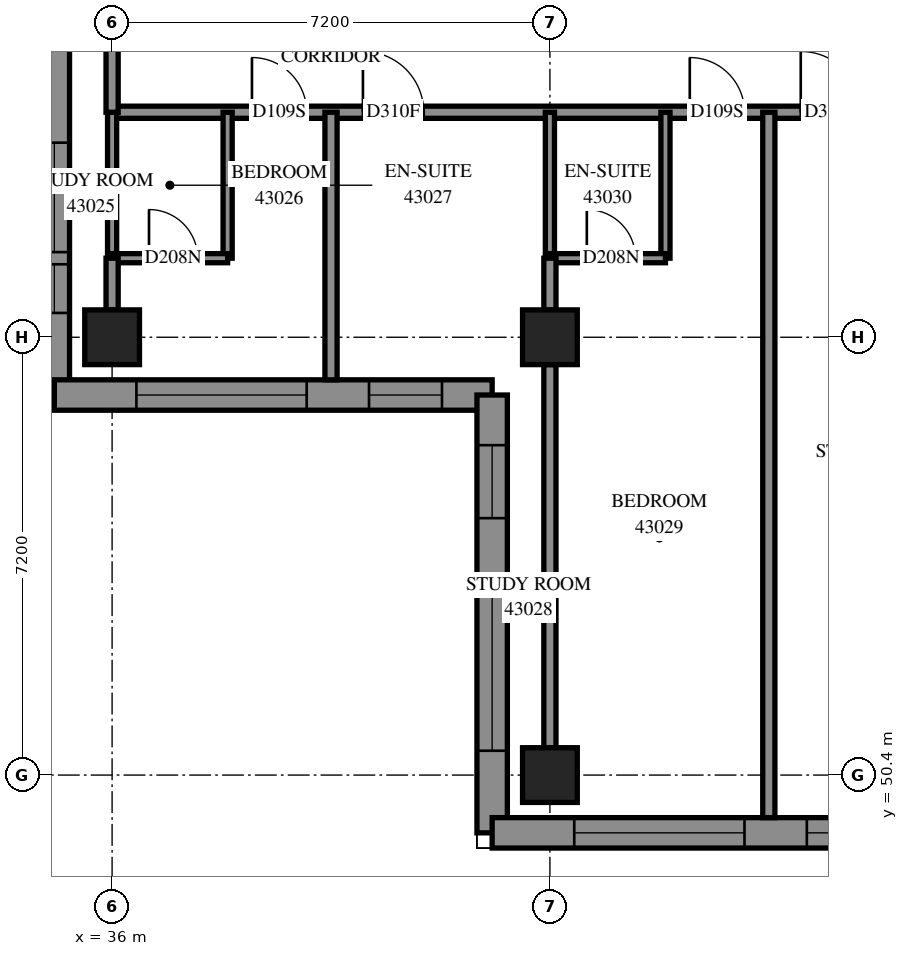
"""IFC4 building model, lengths in metres.
Left out: names, types, materials, properties, quantities, classifications, styles, units other than length and angle.
Written with IfcOpenShell. Run it as: python <this file> out.ifc"""

import sys

from ifc_helpers import new_model, si_unit, direction, frame, frame_2d, origin, origin_2d, place, context, subcontext, project, spatial, polyline, rectangle, outline, extrude, element, fill, save


model = new_model("IFC4")
c1 = context("Model", 3, precision=1e-05, world=origin(), true_north=direction((0.0, 1.0)))
c2 = subcontext(c1, "Body", "Model", "MODEL_VIEW")
j1 = project(units=[si_unit("LENGTHUNIT", "METRE"), si_unit("PLANEANGLEUNIT", "RADIAN")], contexts=[c1])
p1 = place(None, origin())
s1 = spatial("IfcSite", under=j1, at=p1, CompositionType="ELEMENT")
p2 = place(p1, origin())
s2 = spatial("IfcBuilding", under=s1, at=p2, CompositionType="ELEMENT")
p3 = place(p2, frame((0.0, 0.0, 159.2)))
s3 = spatial("IfcBuildingStorey", under=s2, at=p3, CompositionType="ELEMENT", Elevation=159.2)
for number, where, z_axis, x_axis in (
    (1, (36.0, 57.6, 0.0), (0.0, 0.0, 1.0), (1.0, 0.0, 0.0)),
    (2, (43.2, 50.4, 0.0), (0.0, 0.0, 1.0), (1.0, 0.0, 0.0)),
    (3, (43.2, 57.6, 0.0), (0.0, 0.0, 1.0), (1.0, 0.0, 0.0)),
):
    element("IfcColumn", number, at=place(p3, frame(where, z_axis=z_axis, x_axis=x_axis)), inside=s3, PredefinedType="COLUMN", context=c2, shape_type="SweptSolid", body=[
        extrude(rectangle(XDim=0.9, YDim=0.9, at=origin_2d()), origin(), (0.0, 0.0, 1.0), 3.1),
    ])
p4 = place(p3, frame((35.05, 62.738, 0.0), z_axis=(0.0, 0.0, 1.0), x_axis=(0.0, -1.0, 0.0)))
e4 = element("IfcWall", 4, at=p4, inside=s3, PredefinedType="SOLIDWALL", context=c2, shape_type="SweptSolid", body=[
    extrude(outline(polyline([(0.25, -0.25), (6.338, -0.25), (5.838, 0.25), (-0.25, 0.25), (0.25, -0.25)])), origin(), (0.0, 0.0, 1.0), 3.1),
])
p5 = place(p4, frame((1.938, 0.0, 0.7)))
e5 = element("IfcOpeningElement", 5, at=p5, cuts=e4, PredefinedType="OPENING", context=c2, shape_type="SweptSolid", body=[
    extrude(rectangle(XDim=1.8, YDim=2.2, at=frame_2d((0.9, 1.1))), frame((0.0, 0.26, 0.0), z_axis=(0.0, -1.0, 0.0), x_axis=(1.0, 0.0, 0.0)), (0.0, 0.0, 1.0), 0.52),
])
p6 = place(p4, frame((3.938, 0.0, 0.45)))
e6 = element("IfcOpeningElement", 6, at=p6, cuts=e4, PredefinedType="OPENING", context=c2, shape_type="SweptSolid", body=[
    extrude(rectangle(XDim=0.8, YDim=2.5, at=frame_2d((0.4, 1.25))), frame((0.0, 0.26, 0.0), z_axis=(0.0, -1.0, 0.0), x_axis=(1.0, 0.0, 0.0)), (0.0, 0.0, 1.0), 0.52),
])
p7 = place(p3, frame((35.05, 56.65, 0.0), z_axis=(0.0, 0.0, 1.0), x_axis=(1.0, 0.0, 0.0)))
e7 = element("IfcWall", 7, at=p7, inside=s3, PredefinedType="SOLIDWALL", context=c2, shape_type="SweptSolid", body=[
    extrude(outline(polyline([(-0.25, -0.25), (6.95, -0.25), (7.45, 0.25), (0.25, 0.25), (-0.25, -0.25)])), origin(), (0.0, 0.0, 1.0), 3.1),
])
p8 = place(p7, frame((1.35, 0.0, 0.45)))
e8 = element("IfcOpeningElement", 8, at=p8, cuts=e7, PredefinedType="OPENING", context=c2, shape_type="SweptSolid", body=[
    extrude(rectangle(XDim=2.8, YDim=2.5, at=frame_2d((1.4, 1.25))), frame((0.0, 0.26, 0.0), z_axis=(0.0, -1.0, 0.0), x_axis=(1.0, 0.0, 0.0)), (0.0, 0.0, 1.0), 0.52),
])
p9 = place(p7, frame((5.175, 0.0, 0.45)))
e9 = element("IfcOpeningElement", 9, at=p9, cuts=e7, PredefinedType="OPENING", context=c2, shape_type="SweptSolid", body=[
    extrude(rectangle(XDim=1.2, YDim=2.5, at=frame_2d((0.6, 1.25))), frame((0.0, 0.26, 0.0), z_axis=(0.0, -1.0, 0.0), x_axis=(1.0, 0.0, 0.0)), (0.0, 0.0, 1.0), 0.52),
])
p10 = place(p3, frame((42.25, 56.65, 0.0), z_axis=(0.0, 0.0, 1.0), x_axis=(0.0, -1.0, 0.0)))
e10 = element("IfcWall", 10, at=p10, inside=s3, PredefinedType="SOLIDWALL", context=c2, shape_type="SweptSolid", body=[
    extrude(outline(polyline([(0.25, -0.25), (7.45, -0.25), (6.95, 0.25), (-0.25, 0.25), (0.25, -0.25)])), origin(), (0.0, 0.0, 1.0), 3.1),
])
p11 = place(p10, frame((3.05, 0.0, 0.45)))
e11 = element("IfcOpeningElement", 11, at=p11, cuts=e10, PredefinedType="OPENING", context=c2, shape_type="SweptSolid", body=[
    extrude(rectangle(XDim=2.8, YDim=2.5, at=frame_2d((1.4, 1.25))), frame((0.0, 0.26, 0.0), z_axis=(0.0, -1.0, 0.0), x_axis=(1.0, 0.0, 0.0)), (0.0, 0.0, 1.0), 0.52),
])
p12 = place(p10, frame((0.825, 0.0, 0.45)))
e12 = element("IfcOpeningElement", 12, at=p12, cuts=e10, PredefinedType="OPENING", context=c2, shape_type="SweptSolid", body=[
    extrude(rectangle(XDim=1.2, YDim=2.5, at=frame_2d((0.6, 1.25))), frame((0.0, 0.26, 0.0), z_axis=(0.0, -1.0, 0.0), x_axis=(1.0, 0.0, 0.0)), (0.0, 0.0, 1.0), 0.52),
])
p13 = place(p3, frame((42.25, 49.45, 0.0), z_axis=(0.0, 0.0, 1.0), x_axis=(1.0, 0.0, 0.0)))
e13 = element("IfcWall", 13, at=p13, inside=s3, PredefinedType="SOLIDWALL", context=c2, shape_type="SweptSolid", body=[
    extrude(outline(polyline([(-0.25, -0.25), (6.95, -0.25), (7.45, 0.25), (0.25, 0.25), (-0.25, -0.25)])), origin(), (0.0, 0.0, 1.0), 3.1),
])
p14 = place(p13, frame((1.35, 0.0, 0.45)))
e14 = element("IfcOpeningElement", 14, at=p14, cuts=e13, PredefinedType="OPENING", context=c2, shape_type="SweptSolid", body=[
    extrude(rectangle(XDim=2.8, YDim=2.5, at=frame_2d((1.4, 1.25))), frame((0.0, 0.26, 0.0), z_axis=(0.0, -1.0, 0.0), x_axis=(1.0, 0.0, 0.0)), (0.0, 0.0, 1.0), 0.52),
])
p15 = place(p13, frame((5.175, 0.0, 0.45)))
e15 = element("IfcOpeningElement", 15, at=p15, cuts=e13, PredefinedType="OPENING", context=c2, shape_type="SweptSolid", body=[
    extrude(rectangle(XDim=1.2, YDim=2.5, at=frame_2d((0.6, 1.25))), frame((0.0, 0.26, 0.0), z_axis=(0.0, -1.0, 0.0), x_axis=(1.0, 0.0, 0.0)), (0.0, 0.0, 1.0), 0.52),
])
p16 = place(p3, frame((36.0, 61.3, 0.0), z_axis=(0.0, 0.0, 1.0), x_axis=(1.0, 0.0, 0.0)))
e16 = element("IfcWall", 16, at=p16, inside=s3, PredefinedType="PARTITIONING", context=c2, shape_type="SweptSolid", body=[
    extrude(rectangle(XDim=16.9, YDim=0.2, at=frame_2d((8.45, 0.0))), origin(), (0.0, 0.0, 1.0), 3.1),
])
p17 = place(p16, frame((2.3, 0.0, 0.0)))
e17 = element("IfcOpeningElement", 17, at=p17, cuts=e16, PredefinedType="OPENING", context=c2, shape_type="SweptSolid", body=[
    extrude(rectangle(XDim=0.9, YDim=2.1, at=frame_2d((0.45, 1.05))), frame((0.0, 0.11, 0.0), z_axis=(0.0, -1.0, 0.0), x_axis=(1.0, 0.0, 0.0)), (0.0, 0.0, 1.0), 0.22),
])
p18 = place(p16, frame((4.125, 0.0, 0.0)))
e18 = element("IfcOpeningElement", 18, at=p18, cuts=e16, PredefinedType="OPENING", context=c2, shape_type="SweptSolid", body=[
    extrude(rectangle(XDim=1.0, YDim=2.1, at=frame_2d((0.5, 1.05))), frame((0.0, 0.11, 0.0), z_axis=(0.0, -1.0, 0.0), x_axis=(1.0, 0.0, 0.0)), (0.0, 0.0, 1.0), 0.22),
])
p19 = place(p16, frame((9.5, 0.0, 0.0)))
e19 = element("IfcOpeningElement", 19, at=p19, cuts=e16, PredefinedType="OPENING", context=c2, shape_type="SweptSolid", body=[
    extrude(rectangle(XDim=0.9, YDim=2.1, at=frame_2d((0.45, 1.05))), frame((0.0, 0.11, 0.0), z_axis=(0.0, -1.0, 0.0), x_axis=(1.0, 0.0, 0.0)), (0.0, 0.0, 1.0), 0.22),
])
p20 = place(p16, frame((11.325, 0.0, 0.0)))
e20 = element("IfcOpeningElement", 20, at=p20, cuts=e16, PredefinedType="OPENING", context=c2, shape_type="SweptSolid", body=[
    extrude(rectangle(XDim=1.0, YDim=2.1, at=frame_2d((0.5, 1.05))), frame((0.0, 0.11, 0.0), z_axis=(0.0, -1.0, 0.0), x_axis=(1.0, 0.0, 0.0)), (0.0, 0.0, 1.0), 0.22),
])
p21 = place(p16, frame((15.647, 0.0, 0.0)))
e21 = element("IfcOpeningElement", 21, at=p21, cuts=e16, PredefinedType="OPENING", context=c2, shape_type="SweptSolid", body=[
    extrude(rectangle(XDim=1.0, YDim=2.1, at=frame_2d((0.5, 1.05))), frame((0.0, 0.11, 0.0), z_axis=(0.0, -1.0, 0.0), x_axis=(1.0, 0.0, 0.0)), (0.0, 0.0, 1.0), 0.22),
])
p22 = place(p3, frame((46.8, 49.7, 0.0), z_axis=(0.0, 0.0, 1.0), x_axis=(0.0, 1.0, 0.0)))
e22 = element("IfcWall", 22, at=p22, inside=s3, PredefinedType="PARTITIONING", context=c2, shape_type="SweptSolid", body=[
    extrude(rectangle(XDim=11.6, YDim=0.2, at=frame_2d((5.8, 0.0))), origin(), (0.0, 0.0, 1.0), 3.1),
])
p23 = place(p3, frame((43.2, 50.85, 0.0), z_axis=(0.0, 0.0, 1.0), x_axis=(0.0, 1.0, 0.0)))
e23 = element("IfcWall", 23, at=p23, inside=s3, PredefinedType="PARTITIONING", context=c2, shape_type="SweptSolid", body=[
    extrude(rectangle(XDim=6.3, YDim=0.2, at=frame_2d((3.15, 0.0))), origin(), (0.0, 0.0, 1.0), 2.6),
])
p24 = place(p3, frame((39.6, 56.9, 0.0), z_axis=(0.0, 0.0, 1.0), x_axis=(0.0, 1.0, 0.0)))
e24 = element("IfcWall", 24, at=p24, inside=s3, PredefinedType="PARTITIONING", context=c2, shape_type="SweptSolid", body=[
    extrude(rectangle(XDim=4.4, YDim=0.2, at=frame_2d((2.2, 0.0))), origin(), (0.0, 0.0, 1.0), 3.1),
])
p25 = place(p3, frame((37.9, 58.9, 0.0), z_axis=(0.0, 0.0, 1.0), x_axis=(0.0, 1.0, 0.0)))
e25 = element("IfcWall", 25, at=p25, inside=s3, PredefinedType="PARTITIONING", context=c2, shape_type="SweptSolid", body=[
    extrude(rectangle(XDim=2.4, YDim=0.15, at=frame_2d((1.2, 0.0))), origin(), (0.0, 0.0, 1.0), 3.1),
])
p26 = place(p3, frame((36.0, 58.9, 0.0), z_axis=(0.0, 0.0, 1.0), x_axis=(0.0, 1.0, 0.0)))
e26 = element("IfcWall", 26, at=p26, inside=s3, PredefinedType="PARTITIONING", context=c2, shape_type="SweptSolid", body=[
    extrude(rectangle(XDim=2.4, YDim=0.15, at=frame_2d((1.2, 0.0))), origin(), (0.0, 0.0, 1.0), 2.6),
])
for number, where, z_axis, x_axis in (
    (27, (45.1, 58.9, 0.0), (0.0, 0.0, 1.0), (0.0, 1.0, 0.0)),
    (28, (43.2, 58.9, 0.0), (0.0, 0.0, 1.0), (0.0, 1.0, 0.0)),
):
    element("IfcWall", number, at=place(p3, frame(where, z_axis=z_axis, x_axis=x_axis)), inside=s3, PredefinedType="PARTITIONING", context=c2, shape_type="SweptSolid", body=[
        extrude(rectangle(XDim=2.4, YDim=0.15, at=frame_2d((1.2, 0.0))), origin(), (0.0, 0.0, 1.0), 3.1),
    ])
p27 = place(p3, frame((36.0, 61.3, 0.0), z_axis=(0.0, 0.0, 1.0), x_axis=(0.0, 1.0, 0.0)))
e29 = element("IfcWall", 29, at=p27, inside=s3, PredefinedType="PARTITIONING", context=c2, shape_type="SweptSolid", body=[
    extrude(rectangle(XDim=2.2, YDim=0.2, at=frame_2d((1.1, 0.0))), origin(), (0.0, 0.0, 1.0), 2.6),
])
p28 = place(p3, frame((36.0, 58.9, 0.0), z_axis=(0.0, 0.0, 1.0), x_axis=(1.0, 0.0, 0.0)))
e30 = element("IfcWall", 30, at=p28, inside=s3, PredefinedType="PARTITIONING", context=c2, shape_type="SweptSolid", body=[
    extrude(rectangle(XDim=1.9, YDim=0.15, at=frame_2d((0.95, 0.0))), origin(), (0.0, 0.0, 1.0), 3.1),
])
p29 = place(p28, frame((0.607, 0.0, 0.0)))
e31 = element("IfcOpeningElement", 31, at=p29, cuts=e30, PredefinedType="OPENING", context=c2, shape_type="SweptSolid", body=[
    extrude(rectangle(XDim=0.8, YDim=2.1, at=frame_2d((0.4, 1.05))), frame((0.0, 0.085, 0.0), z_axis=(0.0, -1.0, 0.0), x_axis=(1.0, 0.0, 0.0)), (0.0, 0.0, 1.0), 0.17),
])
p30 = place(p3, frame((43.2, 58.9, 0.0), z_axis=(0.0, 0.0, 1.0), x_axis=(1.0, 0.0, 0.0)))
e32 = element("IfcWall", 32, at=p30, inside=s3, PredefinedType="PARTITIONING", context=c2, shape_type="SweptSolid", body=[
    extrude(rectangle(XDim=1.9, YDim=0.15, at=frame_2d((0.95, 0.0))), origin(), (0.0, 0.0, 1.0), 3.1),
])
p31 = place(p30, frame((0.607, 0.0, 0.0)))
e33 = element("IfcOpeningElement", 33, at=p31, cuts=e32, PredefinedType="OPENING", context=c2, shape_type="SweptSolid", body=[
    extrude(rectangle(XDim=0.8, YDim=2.1, at=frame_2d((0.4, 1.05))), frame((0.0, 0.085, 0.0), z_axis=(0.0, -1.0, 0.0), x_axis=(1.0, 0.0, 0.0)), (0.0, 0.0, 1.0), 0.17),
])
p32 = place(p3, frame((36.0, 58.05, 0.0), z_axis=(0.0, 0.0, 1.0), x_axis=(0.0, 1.0, 0.0)))
e34 = element("IfcWall", 34, at=p32, inside=s3, PredefinedType="PARTITIONING", context=c2, shape_type="SweptSolid", body=[
    extrude(rectangle(XDim=0.85, YDim=0.2, at=frame_2d((0.425, 0.0))), origin(), (0.0, 0.0, 1.0), 2.6),
])
p33 = place(p3, frame((43.2, 58.05, 0.0), z_axis=(0.0, 0.0, 1.0), x_axis=(0.0, 1.0, 0.0)))
e35 = element("IfcWall", 35, at=p33, inside=s3, PredefinedType="PARTITIONING", context=c2, shape_type="SweptSolid", body=[
    extrude(rectangle(XDim=0.85, YDim=0.2, at=frame_2d((0.425, 0.0))), origin(), (0.0, 0.0, 1.0), 3.1),
])
p34 = place(p8, origin())
e36 = element("IfcWindow", 36, at=p34, inside=s3, PartitioningType="SINGLE_PANEL", PredefinedType="WINDOW", context=c2, shape_type="SweptSolid", body=[
    extrude(rectangle(XDim=2.8, YDim=2.5, at=frame_2d((1.4, 1.25))), frame((0.0, 0.18, 0.0), z_axis=(0.0, -1.0, 0.0), x_axis=(1.0, 0.0, 0.0)), (0.0, 0.0, 1.0), 0.06),
])
fill(e8, e36)
p35 = place(p9, origin())
e37 = element("IfcWindow", 37, at=p35, inside=s3, PartitioningType="SINGLE_PANEL", PredefinedType="WINDOW", context=c2, shape_type="SweptSolid", body=[
    extrude(rectangle(XDim=1.2, YDim=2.5, at=frame_2d((0.6, 1.25))), frame((0.0, 0.18, 0.0), z_axis=(0.0, -1.0, 0.0), x_axis=(1.0, 0.0, 0.0)), (0.0, 0.0, 1.0), 0.06),
])
fill(e9, e37)
p36 = place(p11, origin())
e38 = element("IfcWindow", 38, at=p36, inside=s3, PartitioningType="SINGLE_PANEL", PredefinedType="WINDOW", context=c2, shape_type="SweptSolid", body=[
    extrude(rectangle(XDim=2.8, YDim=2.5, at=frame_2d((1.4, 1.25))), frame((0.0, 0.18, 0.0), z_axis=(0.0, -1.0, 0.0), x_axis=(1.0, 0.0, 0.0)), (0.0, 0.0, 1.0), 0.06),
])
fill(e11, e38)
p37 = place(p12, origin())
e39 = element("IfcWindow", 39, at=p37, inside=s3, PartitioningType="SINGLE_PANEL", PredefinedType="WINDOW", context=c2, shape_type="SweptSolid", body=[
    extrude(rectangle(XDim=1.2, YDim=2.5, at=frame_2d((0.6, 1.25))), frame((0.0, 0.18, 0.0), z_axis=(0.0, -1.0, 0.0), x_axis=(1.0, 0.0, 0.0)), (0.0, 0.0, 1.0), 0.06),
])
fill(e12, e39)
p38 = place(p14, origin())
e40 = element("IfcWindow", 40, at=p38, inside=s3, PartitioningType="SINGLE_PANEL", PredefinedType="WINDOW", context=c2, shape_type="SweptSolid", body=[
    extrude(rectangle(XDim=2.8, YDim=2.5, at=frame_2d((1.4, 1.25))), frame((0.0, 0.18, 0.0), z_axis=(0.0, -1.0, 0.0), x_axis=(1.0, 0.0, 0.0)), (0.0, 0.0, 1.0), 0.06),
])
fill(e14, e40)
p39 = place(p15, origin())
e41 = element("IfcWindow", 41, at=p39, inside=s3, PartitioningType="SINGLE_PANEL", PredefinedType="WINDOW", context=c2, shape_type="SweptSolid", body=[
    extrude(rectangle(XDim=1.2, YDim=2.5, at=frame_2d((0.6, 1.25))), frame((0.0, 0.18, 0.0), z_axis=(0.0, -1.0, 0.0), x_axis=(1.0, 0.0, 0.0)), (0.0, 0.0, 1.0), 0.06),
])
fill(e15, e41)
p40 = place(p17, origin())
e42 = element("IfcDoor", 42, at=p40, inside=s3, OperationType="SINGLE_SWING_LEFT", PredefinedType="DOOR", context=c2, shape_type="SweptSolid", body=[
    extrude(rectangle(XDim=0.9, YDim=2.1, at=frame_2d((0.45, 1.05))), frame((0.0, 0.025, 0.0), z_axis=(0.0, -1.0, 0.0), x_axis=(1.0, 0.0, 0.0)), (0.0, 0.0, 1.0), 0.05),
])
fill(e17, e42)
p41 = place(p29, origin())
e43 = element("IfcDoor", 43, at=p41, inside=s3, OperationType="SINGLE_SWING_RIGHT", PredefinedType="DOOR", context=c2, shape_type="SweptSolid", body=[
    extrude(rectangle(XDim=0.8, YDim=2.1, at=frame_2d((0.4, 1.05))), frame((0.0, 0.025, 0.0), z_axis=(0.0, -1.0, 0.0), x_axis=(1.0, 0.0, 0.0)), (0.0, 0.0, 1.0), 0.05),
])
fill(e31, e43)
p42 = place(p18, origin())
e44 = element("IfcDoor", 44, at=p42, inside=s3, OperationType="SINGLE_SWING_RIGHT", PredefinedType="DOOR", context=c2, shape_type="SweptSolid", body=[
    extrude(rectangle(XDim=1.0, YDim=2.1, at=frame_2d((0.5, 1.05))), frame((0.0, 0.025, 0.0), z_axis=(0.0, -1.0, 0.0), x_axis=(1.0, 0.0, 0.0)), (0.0, 0.0, 1.0), 0.05),
])
fill(e18, e44)
p43 = place(p19, origin())
e45 = element("IfcDoor", 45, at=p43, inside=s3, OperationType="SINGLE_SWING_LEFT", PredefinedType="DOOR", context=c2, shape_type="SweptSolid", body=[
    extrude(rectangle(XDim=0.9, YDim=2.1, at=frame_2d((0.45, 1.05))), frame((0.0, 0.025, 0.0), z_axis=(0.0, -1.0, 0.0), x_axis=(1.0, 0.0, 0.0)), (0.0, 0.0, 1.0), 0.05),
])
fill(e19, e45)
p44 = place(p31, origin())
e46 = element("IfcDoor", 46, at=p44, inside=s3, OperationType="SINGLE_SWING_RIGHT", PredefinedType="DOOR", context=c2, shape_type="SweptSolid", body=[
    extrude(rectangle(XDim=0.8, YDim=2.1, at=frame_2d((0.4, 1.05))), frame((0.0, 0.025, 0.0), z_axis=(0.0, -1.0, 0.0), x_axis=(1.0, 0.0, 0.0)), (0.0, 0.0, 1.0), 0.05),
])
fill(e33, e46)
p45 = place(p20, origin())
e47 = element("IfcDoor", 47, at=p45, inside=s3, OperationType="SINGLE_SWING_RIGHT", PredefinedType="DOOR", context=c2, shape_type="SweptSolid", body=[
    extrude(rectangle(XDim=1.0, YDim=2.1, at=frame_2d((0.5, 1.05))), frame((0.0, 0.025, 0.0), z_axis=(0.0, -1.0, 0.0), x_axis=(1.0, 0.0, 0.0)), (0.0, 0.0, 1.0), 0.05),
])
fill(e20, e47)
p46 = place(p5, origin())
e48 = element("IfcWindow", 48, at=p46, inside=s3, PartitioningType="SINGLE_PANEL", PredefinedType="WINDOW", context=c2, shape_type="SweptSolid", body=[
    extrude(rectangle(XDim=1.8, YDim=2.2, at=frame_2d((0.9, 1.1))), frame((0.0, 0.18, 0.0), z_axis=(0.0, -1.0, 0.0), x_axis=(1.0, 0.0, 0.0)), (0.0, 0.0, 1.0), 0.06),
])
fill(e5, e48)
p47 = place(p6, origin())
e49 = element("IfcWindow", 49, at=p47, inside=s3, PartitioningType="SINGLE_PANEL", PredefinedType="WINDOW", context=c2, shape_type="SweptSolid", body=[
    extrude(rectangle(XDim=0.8, YDim=2.5, at=frame_2d((0.4, 1.25))), frame((0.0, 0.18, 0.0), z_axis=(0.0, -1.0, 0.0), x_axis=(1.0, 0.0, 0.0)), (0.0, 0.0, 1.0), 0.06),
])
fill(e6, e49)
save(model, sys.argv[1])
